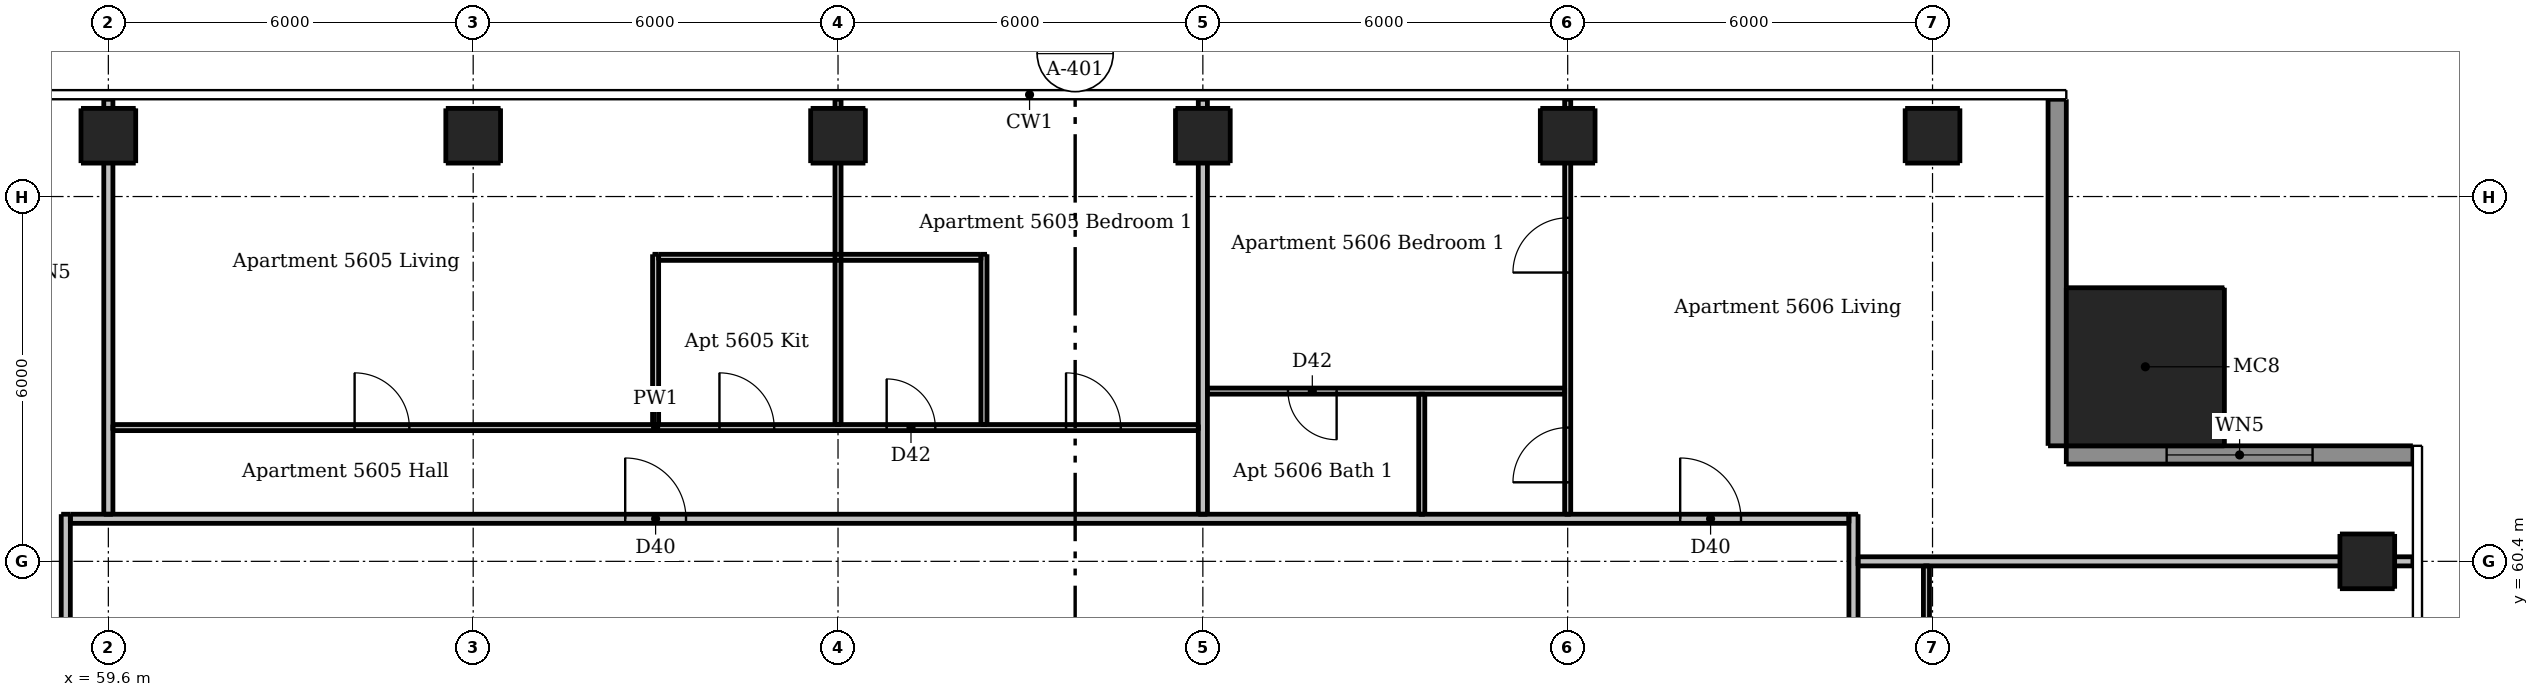
"""IFC4 building model, lengths in metres.
Left out: names, types, materials, properties, quantities, classifications, styles, units other than length and angle.
Written with IfcOpenShell. Run it as: python <this file> out.ifc"""

import sys

from ifc_helpers import new_model, si_unit, direction, frame, frame_2d, origin, origin_2d, place, context, subcontext, project, spatial, rectangle, extrude, element, fill, save


model = new_model("IFC4")
c1 = context("Model", 3, precision=1e-05, world=origin(), true_north=direction((0.0, 1.0)))
c2 = subcontext(c1, "Body", "Model", "MODEL_VIEW")
j1 = project(units=[si_unit("LENGTHUNIT", "METRE"), si_unit("PLANEANGLEUNIT", "RADIAN")], contexts=[c1])
p1 = place(None, origin())
s1 = spatial("IfcSite", under=j1, at=p1, CompositionType="ELEMENT")
p2 = place(p1, origin())
s2 = spatial("IfcBuilding", under=s1, at=p2, CompositionType="ELEMENT")
p3 = place(p2, frame((0.0, 0.0, 210.1)))
s3 = spatial("IfcBuildingStorey", under=s2, at=p3, CompositionType="ELEMENT", Elevation=210.1)
for number, where, z_axis, x_axis in (
    (1, (96.75, 60.4, 0.0), (0.0, 0.0, 1.0), (1.0, 0.0, 0.0)),
    (2, (59.6, 67.4, 0.0), (0.0, 0.0, 1.0), (1.0, 0.0, 0.0)),
    (3, (65.6, 67.4, 0.0), (0.0, 0.0, 1.0), (1.0, 0.0, 0.0)),
    (4, (71.6, 67.4, 0.0), (0.0, 0.0, 1.0), (1.0, 0.0, 0.0)),
    (5, (77.6, 67.4, 0.0), (0.0, 0.0, 1.0), (1.0, 0.0, 0.0)),
    (6, (83.6, 67.4, 0.0), (0.0, 0.0, 1.0), (1.0, 0.0, 0.0)),
    (7, (89.6, 67.4, 0.0), (0.0, 0.0, 1.0), (1.0, 0.0, 0.0)),
):
    element("IfcColumn", number, at=place(p3, frame(where, z_axis=z_axis, x_axis=x_axis)), inside=s3, PredefinedType="COLUMN", context=c2, shape_type="SweptSolid", body=[
        extrude(rectangle(XDim=0.9, YDim=0.9, at=origin_2d()), origin(), (0.0, 0.0, 1.0), 3.05),
    ])
p4 = place(p3, frame((93.1, 63.6, 0.0), z_axis=(0.0, 0.0, 1.0), x_axis=(1.0, 0.0, 0.0)))
e8 = element("IfcColumn", 8, at=p4, inside=s3, PredefinedType="COLUMN", context=c2, shape_type="SweptSolid", body=[
    extrude(rectangle(XDim=2.6, YDim=2.6, at=origin_2d()), origin(), (0.0, 0.0, 1.0), 3.3),
])
p5 = place(p3, frame((97.5, 62.15, 0.0), z_axis=(0.0, 0.0, 1.0), x_axis=(-1.0, 0.0, 0.0)))
e9 = element("IfcWall", 9, at=p5, inside=s3, PredefinedType="SOLIDWALL", context=c2, shape_type="SweptSolid", body=[
    extrude(rectangle(XDim=5.7, YDim=0.3, at=frame_2d((2.85, 0.0))), origin(), (0.0, 0.0, 1.0), 3.05),
])
p6 = place(p5, frame((1.65, 0.0, 0.15)))
e10 = element("IfcOpeningElement", 10, at=p6, cuts=e9, PredefinedType="OPENING", context=c2, shape_type="SweptSolid", body=[
    extrude(rectangle(XDim=2.4, YDim=2.1, at=frame_2d((1.2, 1.05))), frame((0.0, 0.16, 0.0), z_axis=(0.0, -1.0, 0.0), x_axis=(1.0, 0.0, 0.0)), (0.0, 0.0, 1.0), 0.32),
])
p7 = place(p3, frame((91.65, 62.3, 0.0), z_axis=(0.0, 0.0, 1.0), x_axis=(0.0, 1.0, 0.0)))
e11 = element("IfcWall", 11, at=p7, inside=s3, PredefinedType="SOLIDWALL", context=c2, shape_type="SweptSolid", body=[
    extrude(rectangle(XDim=5.7, YDim=0.3, at=frame_2d((2.85, 0.0))), origin(), (0.0, 0.0, 1.0), 3.05),
])
p8 = place(p3, frame((68.6, 62.65, 0.0), z_axis=(0.0, 0.0, 1.0), x_axis=(0.0, 1.0, 0.0)))
e12 = element("IfcWall", 12, at=p8, inside=s3, PredefinedType="PARTITIONING", context=c2, shape_type="SweptSolid", body=[
    extrude(rectangle(XDim=2.8, YDim=0.1, at=frame_2d((1.4, 0.0))), origin(), (0.0, 0.0, 1.0), 3.05),
])
p9 = place(p3, frame((71.6, 62.65, 0.0), z_axis=(0.0, 0.0, 1.0), x_axis=(0.0, 1.0, 0.0)))
e13 = element("IfcWall", 13, at=p9, inside=s3, PredefinedType="PARTITIONING", context=c2, shape_type="SweptSolid", body=[
    extrude(rectangle(XDim=5.35, YDim=0.1, at=frame_2d((2.675, 0.0))), origin(), (0.0, 0.0, 1.0), 2.516),
])
p10 = place(p3, frame((74.0, 62.65, 0.0), z_axis=(0.0, 0.0, 1.0), x_axis=(0.0, 1.0, 0.0)))
e14 = element("IfcWall", 14, at=p10, inside=s3, PredefinedType="PARTITIONING", context=c2, shape_type="SweptSolid", body=[
    extrude(rectangle(XDim=2.8, YDim=0.1, at=frame_2d((1.4, 0.0))), origin(), (0.0, 0.0, 1.0), 3.05),
])
p11 = place(p3, frame((81.2, 61.175, 0.0), z_axis=(0.0, 0.0, 1.0), x_axis=(0.0, 1.0, 0.0)))
e15 = element("IfcWall", 15, at=p11, inside=s3, PredefinedType="PARTITIONING", context=c2, shape_type="SweptSolid", body=[
    extrude(rectangle(XDim=1.975, YDim=0.1, at=frame_2d((0.987, 0.0))), origin(), (0.0, 0.0, 1.0), 3.05),
])
p12 = place(p3, frame((83.6, 61.175, 0.0), z_axis=(0.0, 0.0, 1.0), x_axis=(0.0, 1.0, 0.0)))
e16 = element("IfcWall", 16, at=p12, inside=s3, PredefinedType="PARTITIONING", context=c2, shape_type="SweptSolid", body=[
    extrude(rectangle(XDim=6.825, YDim=0.1, at=frame_2d((3.413, 0.0))), origin(), (0.0, 0.0, 1.0), 2.516),
])
p13 = place(p12, frame((0.525, 0.0, 0.0)))
e17 = element("IfcOpeningElement", 17, at=p13, cuts=e16, PredefinedType="OPENING", context=c2, shape_type="SweptSolid", body=[
    extrude(rectangle(XDim=0.9, YDim=2.1, at=frame_2d((0.45, 1.05))), frame((0.0, 0.06, 0.0), z_axis=(0.0, -1.0, 0.0), x_axis=(1.0, 0.0, 0.0)), (0.0, 0.0, 1.0), 0.12),
])
p14 = place(p12, frame((3.975, 0.0, 0.0)))
e18 = element("IfcOpeningElement", 18, at=p14, cuts=e16, PredefinedType="OPENING", context=c2, shape_type="SweptSolid", body=[
    extrude(rectangle(XDim=0.9, YDim=2.1, at=frame_2d((0.45, 1.05))), frame((0.0, 0.06, 0.0), z_axis=(0.0, -1.0, 0.0), x_axis=(1.0, 0.0, 0.0)), (0.0, 0.0, 1.0), 0.12),
])
p15 = place(p3, frame((89.5, 60.325, 0.0), z_axis=(0.0, 0.0, 1.0), x_axis=(0.0, -1.0, 0.0)))
e19 = element("IfcWall", 19, at=p15, inside=s3, PredefinedType="PARTITIONING", context=c2, shape_type="SweptSolid", body=[
    extrude(rectangle(XDim=20.85, YDim=0.1, at=frame_2d((10.425, 0.0))), origin(), (0.0, 0.0, 1.0), 2.51),
])
p16 = place(p15, frame((12.975, 0.0, 0.0)))
e20 = element("IfcOpeningElement", 20, at=p16, cuts=e19, PredefinedType="OPENING", context=c2, shape_type="SweptSolid", body=[
    extrude(rectangle(XDim=0.9, YDim=2.1, at=frame_2d((0.45, 1.05))), frame((0.0, 0.06, 0.0), z_axis=(0.0, -1.0, 0.0), x_axis=(1.0, 0.0, 0.0)), (0.0, 0.0, 1.0), 0.12),
])
p17 = place(p15, frame((6.975, 0.0, 0.0)))
e21 = element("IfcOpeningElement", 21, at=p17, cuts=e19, PredefinedType="OPENING", context=c2, shape_type="SweptSolid", body=[
    extrude(rectangle(XDim=0.9, YDim=2.1, at=frame_2d((0.45, 1.05))), frame((0.0, 0.06, 0.0), z_axis=(0.0, -1.0, 0.0), x_axis=(1.0, 0.0, 0.0)), (0.0, 0.0, 1.0), 0.12),
])
p18 = place(p15, frame((18.975, 0.0, 0.0)))
e22 = element("IfcOpeningElement", 22, at=p18, cuts=e19, PredefinedType="OPENING", context=c2, shape_type="SweptSolid", body=[
    extrude(rectangle(XDim=0.9, YDim=2.1, at=frame_2d((0.45, 1.05))), frame((0.0, 0.06, 0.0), z_axis=(0.0, -1.0, 0.0), x_axis=(1.0, 0.0, 0.0)), (0.0, 0.0, 1.0), 0.12),
])
p19 = place(p15, frame((1.275, 0.0, 0.0)))
e23 = element("IfcOpeningElement", 23, at=p19, cuts=e19, PredefinedType="OPENING", context=c2, shape_type="SweptSolid", body=[
    extrude(rectangle(XDim=0.9, YDim=2.1, at=frame_2d((0.45, 1.05))), frame((0.0, 0.06, 0.0), z_axis=(0.0, -1.0, 0.0), x_axis=(1.0, 0.0, 0.0)), (0.0, 0.0, 1.0), 0.12),
])
p20 = place(p15, frame((4.325, 0.0, 0.0)))
e24 = element("IfcOpeningElement", 24, at=p20, cuts=e19, PredefinedType="OPENING", context=c2, shape_type="SweptSolid", body=[
    extrude(rectangle(XDim=0.8, YDim=2.1, at=frame_2d((0.4, 1.05))), frame((0.0, 0.06, 0.0), z_axis=(0.0, -1.0, 0.0), x_axis=(1.0, 0.0, 0.0)), (0.0, 0.0, 1.0), 0.12),
])
p21 = place(p3, frame((68.65, 65.4, 0.0), z_axis=(0.0, 0.0, 1.0), x_axis=(1.0, 0.0, 0.0)))
e25 = element("IfcWall", 25, at=p21, inside=s3, PredefinedType="PARTITIONING", context=c2, shape_type="SweptSolid", body=[
    extrude(rectangle(XDim=5.3, YDim=0.1, at=frame_2d((2.65, 0.0))), origin(), (0.0, 0.0, 1.0), 3.05),
])
p22 = place(p3, frame((83.55, 63.2, 0.0), z_axis=(0.0, 0.0, 1.0), x_axis=(-1.0, 0.0, 0.0)))
e26 = element("IfcWall", 26, at=p22, inside=s3, PredefinedType="PARTITIONING", context=c2, shape_type="SweptSolid", body=[
    extrude(rectangle(XDim=5.875, YDim=0.1, at=frame_2d((2.938, 0.0))), origin(), (0.0, 0.0, 1.0), 3.05),
])
p23 = place(p22, frame((3.75, 0.0, 0.0)))
e27 = element("IfcOpeningElement", 27, at=p23, cuts=e26, PredefinedType="OPENING", context=c2, shape_type="SweptSolid", body=[
    extrude(rectangle(XDim=0.8, YDim=2.1, at=frame_2d((0.4, 1.05))), frame((0.0, 0.06, 0.0), z_axis=(0.0, -1.0, 0.0), x_axis=(1.0, 0.0, 0.0)), (0.0, 0.0, 1.0), 0.12),
])
p24 = place(p3, frame((59.675, 62.6, 0.0), z_axis=(0.0, 0.0, 1.0), x_axis=(1.0, 0.0, 0.0)))
e28 = element("IfcWall", 28, at=p24, inside=s3, PredefinedType="PARTITIONING", context=c2, shape_type="SweptSolid", body=[
    extrude(rectangle(XDim=17.85, YDim=0.1, at=frame_2d((8.925, 0.0))), origin(), (0.0, 0.0, 1.0), 3.05),
])
p25 = place(p24, frame((3.975, 0.0, 0.0)))
e29 = element("IfcOpeningElement", 29, at=p25, cuts=e28, PredefinedType="OPENING", context=c2, shape_type="SweptSolid", body=[
    extrude(rectangle(XDim=0.9, YDim=2.1, at=frame_2d((0.45, 1.05))), frame((0.0, 0.06, 0.0), z_axis=(0.0, -1.0, 0.0), x_axis=(1.0, 0.0, 0.0)), (0.0, 0.0, 1.0), 0.12),
])
p26 = place(p24, frame((9.975, 0.0, 0.0)))
e30 = element("IfcOpeningElement", 30, at=p26, cuts=e28, PredefinedType="OPENING", context=c2, shape_type="SweptSolid", body=[
    extrude(rectangle(XDim=0.9, YDim=2.1, at=frame_2d((0.45, 1.05))), frame((0.0, 0.06, 0.0), z_axis=(0.0, -1.0, 0.0), x_axis=(1.0, 0.0, 0.0)), (0.0, 0.0, 1.0), 0.12),
])
p27 = place(p24, frame((15.675, 0.0, 0.0)))
e31 = element("IfcOpeningElement", 31, at=p27, cuts=e28, PredefinedType="OPENING", context=c2, shape_type="SweptSolid", body=[
    extrude(rectangle(XDim=0.9, YDim=2.1, at=frame_2d((0.45, 1.05))), frame((0.0, 0.06, 0.0), z_axis=(0.0, -1.0, 0.0), x_axis=(1.0, 0.0, 0.0)), (0.0, 0.0, 1.0), 0.12),
])
p28 = place(p24, frame((12.725, 0.0, 0.0)))
e32 = element("IfcOpeningElement", 32, at=p28, cuts=e28, PredefinedType="OPENING", context=c2, shape_type="SweptSolid", body=[
    extrude(rectangle(XDim=0.8, YDim=2.1, at=frame_2d((0.4, 1.05))), frame((0.0, 0.06, 0.0), z_axis=(0.0, -1.0, 0.0), x_axis=(1.0, 0.0, 0.0)), (0.0, 0.0, 1.0), 0.12),
])
p29 = place(p3, frame((58.9, 30.325, 0.0), z_axis=(0.0, 0.0, 1.0), x_axis=(0.0, 1.0, 0.0)))
e33 = element("IfcWall", 33, at=p29, inside=s3, PredefinedType="PARTITIONING", context=c2, shape_type="SweptSolid", body=[
    extrude(rectangle(XDim=30.85, YDim=0.15, at=frame_2d((15.425, 0.0))), origin(), (0.0, 0.0, 1.0), 3.05),
])
p30 = place(p29, frame((9.225, 0.0, 0.0)))
e34 = element("IfcOpeningElement", 34, at=p30, cuts=e33, PredefinedType="OPENING", context=c2, shape_type="SweptSolid", body=[
    extrude(rectangle(XDim=1.0, YDim=2.1, at=frame_2d((0.5, 1.05))), frame((0.0, 0.085, 0.0), z_axis=(0.0, -1.0, 0.0), x_axis=(1.0, 0.0, 0.0)), (0.0, 0.0, 1.0), 0.17),
])
p31 = place(p29, frame((26.925, 0.0, 0.0)))
e35 = element("IfcOpeningElement", 35, at=p31, cuts=e33, PredefinedType="OPENING", context=c2, shape_type="SweptSolid", body=[
    extrude(rectangle(XDim=1.0, YDim=2.1, at=frame_2d((0.5, 1.05))), frame((0.0, 0.085, 0.0), z_axis=(0.0, -1.0, 0.0), x_axis=(1.0, 0.0, 0.0)), (0.0, 0.0, 1.0), 0.17),
])
p32 = place(p3, frame((59.6, 61.175, 0.0), z_axis=(0.0, 0.0, 1.0), x_axis=(0.0, 1.0, 0.0)))
e36 = element("IfcWall", 36, at=p32, inside=s3, PredefinedType="PARTITIONING", context=c2, shape_type="SweptSolid", body=[
    extrude(rectangle(XDim=6.825, YDim=0.15, at=frame_2d((3.413, 0.0))), origin(), (0.0, 0.0, 1.0), 2.51),
])
p33 = place(p3, frame((77.6, 61.175, 0.0), z_axis=(0.0, 0.0, 1.0), x_axis=(0.0, 1.0, 0.0)))
e37 = element("IfcWall", 37, at=p33, inside=s3, PredefinedType="PARTITIONING", context=c2, shape_type="SweptSolid", body=[
    extrude(rectangle(XDim=6.825, YDim=0.15, at=frame_2d((3.413, 0.0))), origin(), (0.0, 0.0, 1.0), 2.516),
])
p34 = place(p3, frame((88.3, 61.175, 0.0), z_axis=(0.0, 0.0, 1.0), x_axis=(0.0, -1.0, 0.0)))
e38 = element("IfcWall", 38, at=p34, inside=s3, PredefinedType="PARTITIONING", context=c2, shape_type="SweptSolid", body=[
    extrude(rectangle(XDim=29.4, YDim=0.15, at=frame_2d((14.7, 0.0))), origin(), (0.0, 0.0, 1.0), 3.05),
])
p35 = place(p34, frame((28.125, 0.0, 0.0)))
e39 = element("IfcOpeningElement", 39, at=p35, cuts=e38, PredefinedType="OPENING", context=c2, shape_type="SweptSolid", body=[
    extrude(rectangle(XDim=1.0, YDim=2.1, at=frame_2d((0.5, 1.05))), frame((0.0, 0.085, 0.0), z_axis=(0.0, -1.0, 0.0), x_axis=(1.0, 0.0, 0.0)), (0.0, 0.0, 1.0), 0.17),
])
p36 = place(p34, frame((10.775, 0.0, 0.0)))
e40 = element("IfcOpeningElement", 40, at=p36, cuts=e38, PredefinedType="OPENING", context=c2, shape_type="SweptSolid", body=[
    extrude(rectangle(XDim=1.0, YDim=2.1, at=frame_2d((0.5, 1.05))), frame((0.0, 0.085, 0.0), z_axis=(0.0, -1.0, 0.0), x_axis=(1.0, 0.0, 0.0)), (0.0, 0.0, 1.0), 0.17),
])
p37 = place(p3, frame((58.975, 61.1, 0.0), z_axis=(0.0, 0.0, 1.0), x_axis=(1.0, 0.0, 0.0)))
e41 = element("IfcWall", 41, at=p37, inside=s3, PredefinedType="PARTITIONING", context=c2, shape_type="SweptSolid", body=[
    extrude(rectangle(XDim=29.25, YDim=0.15, at=frame_2d((14.625, 0.0))), origin(), (0.0, 0.0, 1.0), 3.05),
])
p38 = place(p37, frame((9.125, 0.0, 0.0)))
e42 = element("IfcOpeningElement", 42, at=p38, cuts=e41, PredefinedType="OPENING", context=c2, shape_type="SweptSolid", body=[
    extrude(rectangle(XDim=1.0, YDim=2.1, at=frame_2d((0.5, 1.05))), frame((0.0, 0.085, 0.0), z_axis=(0.0, -1.0, 0.0), x_axis=(1.0, 0.0, 0.0)), (0.0, 0.0, 1.0), 0.17),
])
p39 = place(p37, frame((26.475, 0.0, 0.0)))
e43 = element("IfcOpeningElement", 43, at=p39, cuts=e41, PredefinedType="OPENING", context=c2, shape_type="SweptSolid", body=[
    extrude(rectangle(XDim=1.0, YDim=2.1, at=frame_2d((0.5, 1.05))), frame((0.0, 0.085, 0.0), z_axis=(0.0, -1.0, 0.0), x_axis=(1.0, 0.0, 0.0)), (0.0, 0.0, 1.0), 0.17),
])
p40 = place(p3, frame((88.375, 60.4, 0.0), z_axis=(0.0, 0.0, 1.0), x_axis=(1.0, 0.0, 0.0)))
e44 = element("IfcWall", 44, at=p40, inside=s3, PredefinedType="PARTITIONING", context=c2, shape_type="SweptSolid", body=[
    extrude(rectangle(XDim=9.125, YDim=0.15, at=frame_2d((4.562, 0.0))), origin(), (0.0, 0.0, 1.0), 2.59),
])
p41 = place(p6, origin())
e45 = element("IfcWindow", 45, at=p41, inside=s3, PartitioningType="DOUBLE_PANEL_VERTICAL", PredefinedType="WINDOW", context=c2, shape_type="SweptSolid", body=[
    extrude(rectangle(XDim=2.4, YDim=2.1, at=frame_2d((1.2, 1.05))), frame((0.0, 0.03, 0.0), z_axis=(0.0, -1.0, 0.0), x_axis=(1.0, 0.0, 0.0)), (0.0, 0.0, 1.0), 0.06),
])
fill(e10, e45)
p42 = place(p38, origin())
e46 = element("IfcDoor", 46, at=p42, inside=s3, OperationType="SINGLE_SWING_LEFT", PredefinedType="DOOR", context=c2, shape_type="SweptSolid", body=[
    extrude(rectangle(XDim=1.0, YDim=2.1, at=frame_2d((0.5, 1.05))), frame((0.0, 0.025, 0.0), z_axis=(0.0, -1.0, 0.0), x_axis=(1.0, 0.0, 0.0)), (0.0, 0.0, 1.0), 0.05),
])
fill(e42, e46)
p43 = place(p25, origin())
e47 = element("IfcDoor", 47, at=p43, inside=s3, OperationType="SINGLE_SWING_LEFT", PredefinedType="DOOR", context=c2, shape_type="SweptSolid", body=[
    extrude(rectangle(XDim=0.9, YDim=2.1, at=frame_2d((0.45, 1.05))), frame((0.0, 0.025, 0.0), z_axis=(0.0, -1.0, 0.0), x_axis=(1.0, 0.0, 0.0)), (0.0, 0.0, 1.0), 0.05),
])
fill(e29, e47)
p44 = place(p26, origin())
e48 = element("IfcDoor", 48, at=p44, inside=s3, OperationType="SINGLE_SWING_LEFT", PredefinedType="DOOR", context=c2, shape_type="SweptSolid", body=[
    extrude(rectangle(XDim=0.9, YDim=2.1, at=frame_2d((0.45, 1.05))), frame((0.0, 0.025, 0.0), z_axis=(0.0, -1.0, 0.0), x_axis=(1.0, 0.0, 0.0)), (0.0, 0.0, 1.0), 0.05),
])
fill(e30, e48)
p45 = place(p27, origin())
e49 = element("IfcDoor", 49, at=p45, inside=s3, OperationType="SINGLE_SWING_LEFT", PredefinedType="DOOR", context=c2, shape_type="SweptSolid", body=[
    extrude(rectangle(XDim=0.9, YDim=2.1, at=frame_2d((0.45, 1.05))), frame((0.0, 0.025, 0.0), z_axis=(0.0, -1.0, 0.0), x_axis=(1.0, 0.0, 0.0)), (0.0, 0.0, 1.0), 0.05),
])
fill(e31, e49)
p46 = place(p28, origin())
e50 = element("IfcDoor", 50, at=p46, inside=s3, OperationType="SINGLE_SWING_LEFT", PredefinedType="DOOR", context=c2, shape_type="SweptSolid", body=[
    extrude(rectangle(XDim=0.8, YDim=2.1, at=frame_2d((0.4, 1.05))), frame((0.0, 0.025, 0.0), z_axis=(0.0, -1.0, 0.0), x_axis=(1.0, 0.0, 0.0)), (0.0, 0.0, 1.0), 0.05),
])
fill(e32, e50)
p47 = place(p39, origin())
e51 = element("IfcDoor", 51, at=p47, inside=s3, OperationType="SINGLE_SWING_LEFT", PredefinedType="DOOR", context=c2, shape_type="SweptSolid", body=[
    extrude(rectangle(XDim=1.0, YDim=2.1, at=frame_2d((0.5, 1.05))), frame((0.0, 0.025, 0.0), z_axis=(0.0, -1.0, 0.0), x_axis=(1.0, 0.0, 0.0)), (0.0, 0.0, 1.0), 0.05),
])
fill(e43, e51)
p48 = place(p13, origin())
e52 = element("IfcDoor", 52, at=p48, inside=s3, OperationType="SINGLE_SWING_LEFT", PredefinedType="DOOR", context=c2, shape_type="SweptSolid", body=[
    extrude(rectangle(XDim=0.9, YDim=2.1, at=frame_2d((0.45, 1.05))), frame((0.0, 0.025, 0.0), z_axis=(0.0, -1.0, 0.0), x_axis=(1.0, 0.0, 0.0)), (0.0, 0.0, 1.0), 0.05),
])
fill(e17, e52)
p49 = place(p14, origin())
e53 = element("IfcDoor", 53, at=p49, inside=s3, OperationType="SINGLE_SWING_LEFT", PredefinedType="DOOR", context=c2, shape_type="SweptSolid", body=[
    extrude(rectangle(XDim=0.9, YDim=2.1, at=frame_2d((0.45, 1.05))), frame((0.0, 0.025, 0.0), z_axis=(0.0, -1.0, 0.0), x_axis=(1.0, 0.0, 0.0)), (0.0, 0.0, 1.0), 0.05),
])
fill(e18, e53)
p50 = place(p23, origin())
e54 = element("IfcDoor", 54, at=p50, inside=s3, OperationType="SINGLE_SWING_LEFT", PredefinedType="DOOR", context=c2, shape_type="SweptSolid", body=[
    extrude(rectangle(XDim=0.8, YDim=2.1, at=frame_2d((0.4, 1.05))), frame((0.0, 0.025, 0.0), z_axis=(0.0, -1.0, 0.0), x_axis=(1.0, 0.0, 0.0)), (0.0, 0.0, 1.0), 0.05),
])
fill(e27, e54)
save(model, sys.argv[1])
